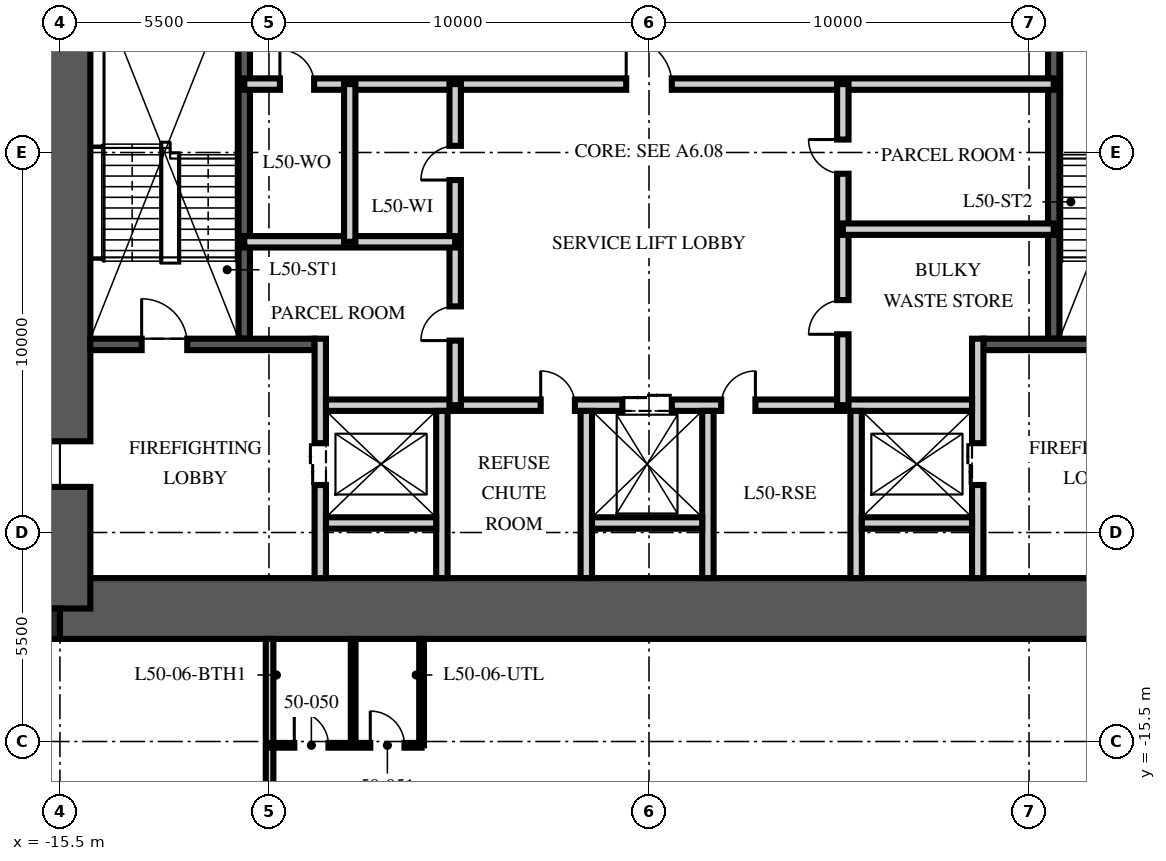
"""IFC4 building model, lengths in metres.
Left out: names, types, materials, properties, quantities, classifications, styles, units other than length and angle.
Written with IfcOpenShell. Run it as: python <this file> out.ifc"""

import sys

from ifc_helpers import new_model, si_unit, direction, frame, frame_2d, origin, origin_2d, place, context, subcontext, project, spatial, rectangle, extrude, element, fill, save


model = new_model("IFC4")
c1 = context("Model", 3, precision=1e-05, world=origin(), true_north=direction((0.0, 1.0)))
c2 = subcontext(c1, "Body", "Model", "MODEL_VIEW")
j1 = project(units=[si_unit("LENGTHUNIT", "METRE"), si_unit("PLANEANGLEUNIT", "RADIAN")], contexts=[c1])
p1 = place(None, origin())
s1 = spatial("IfcSite", under=j1, at=p1, CompositionType="ELEMENT")
p2 = place(p1, origin())
s2 = spatial("IfcBuilding", under=s1, at=p2, CompositionType="ELEMENT")
p3 = place(p2, frame((0.0, 0.0, 203.25)))
s3 = spatial("IfcBuildingStorey", under=s2, at=p3, CompositionType="ELEMENT", Elevation=203.25)
p4 = place(p3, frame((-15.5, -12.0, -0.25), z_axis=(0.0, 0.0, 1.0), x_axis=(1.0, 0.0, 0.0)))
e1 = element("IfcWall", 1, at=p4, inside=s3, PredefinedType="SHEAR", context=c2, shape_type="SweptSolid", body=[
    extrude(rectangle(XDim=31.0, YDim=1.6, at=frame_2d((15.5, 0.0))), origin(), (0.0, 0.0, 1.0), 3.75),
])
p5 = place(p3, frame((-15.5, -12.0, -0.25), z_axis=(0.0, 0.0, 1.0), x_axis=(0.0, 1.0, 0.0)))
e2 = element("IfcWall", 2, at=p5, inside=s3, PredefinedType="SHEAR", context=c2, shape_type="SweptSolid", body=[
    extrude(rectangle(XDim=24.0, YDim=1.6, at=frame_2d((12.0, 0.0))), origin(), (0.0, 0.0, 1.0), 3.75),
])
p6 = place(p5, frame((3.2, 0.0, 0.25)))
e3 = element("IfcOpeningElement", 3, at=p6, cuts=e2, PredefinedType="OPENING", context=c2, shape_type="SweptSolid", body=[
    extrude(rectangle(XDim=1.2, YDim=2.1, at=frame_2d((0.6, 1.05))), frame((0.0, 0.81, 0.0), z_axis=(0.0, -1.0, 0.0), x_axis=(1.0, 0.0, 0.0)), (0.0, 0.0, 1.0), 1.62),
])
p7 = place(p5, frame((19.3, 0.0, 0.25)))
e4 = element("IfcOpeningElement", 4, at=p7, cuts=e2, PredefinedType="OPENING", context=c2, shape_type="SweptSolid", body=[
    extrude(rectangle(XDim=1.8, YDim=2.1, at=frame_2d((0.9, 1.05))), frame((0.0, 0.81, 0.0), z_axis=(0.0, -1.0, 0.0), x_axis=(1.0, 0.0, 0.0)), (0.0, 0.0, 1.0), 1.62),
])
p8 = place(p3, frame((-15.9, -12.4, -0.25), z_axis=(0.0, 0.0, 1.0), x_axis=(1.0, 0.0, 0.0)))
e5 = element("IfcColumn", 5, at=p8, inside=s3, PredefinedType="COLUMN", context=c2, shape_type="SweptSolid", body=[
    extrude(rectangle(XDim=0.8, YDim=0.8, at=origin_2d()), origin(), (0.0, 0.0, 1.0), 3.75),
])
p9 = place(p3, frame((-10.65, -4.9, 0.0), z_axis=(0.0, 0.0, 1.0), x_axis=(0.0, 1.0, 0.0)))
e6 = element("IfcWall", 6, at=p9, inside=s3, PredefinedType="SOLIDWALL", context=c2, shape_type="SweptSolid", body=[
    extrude(rectangle(XDim=10.1, YDim=0.3, at=frame_2d((5.05, 0.0))), origin(), (0.0, 0.0, 1.0), 3.5),
])
p10 = place(p3, frame((-14.7, -5.05, 0.0), z_axis=(0.0, 0.0, 1.0), x_axis=(1.0, 0.0, 0.0)))
e7 = element("IfcWall", 7, at=p10, inside=s3, PredefinedType="SOLIDWALL", context=c2, shape_type="SweptSolid", body=[
    extrude(rectangle(XDim=5.9, YDim=0.3, at=frame_2d((2.95, 0.0))), origin(), (0.0, 0.0, 1.0), 3.5),
])
p11 = place(p10, frame((1.35, 0.0, 0.0)))
e8 = element("IfcOpeningElement", 8, at=p11, cuts=e7, PredefinedType="OPENING", context=c2, shape_type="SweptSolid", body=[
    extrude(rectangle(XDim=1.2, YDim=2.1, at=frame_2d((0.6, 1.05))), frame((0.0, 0.16, 0.0), z_axis=(0.0, -1.0, 0.0), x_axis=(1.0, 0.0, 0.0)), (0.0, 0.0, 1.0), 0.32),
])
p12 = place(p3, frame((-8.65, -11.2, 0.0), z_axis=(0.0, 0.0, 1.0), x_axis=(0.0, 1.0, 0.0)))
e9 = element("IfcWall", 9, at=p12, inside=s3, PredefinedType="PARTITIONING", context=c2, shape_type="SweptSolid", body=[
    extrude(rectangle(XDim=6.3, YDim=0.3, at=frame_2d((3.15, 0.0))), origin(), (0.0, 0.0, 1.0), 3.5),
])
p13 = place(p12, frame((2.45, 0.0, 0.0)))
e10 = element("IfcOpeningElement", 10, at=p13, cuts=e9, PredefinedType="OPENING", context=c2, shape_type="SweptSolid", body=[
    extrude(rectangle(XDim=1.1, YDim=2.1, at=frame_2d((0.55, 1.05))), frame((0.0, 0.16, 0.0), z_axis=(0.0, -1.0, 0.0), x_axis=(1.0, 0.0, 0.0)), (0.0, 0.0, 1.0), 0.32),
])
p14 = place(p3, frame((10.65, -4.9, 0.0), z_axis=(0.0, 0.0, 1.0), x_axis=(0.0, 1.0, 0.0)))
e11 = element("IfcWall", 11, at=p14, inside=s3, PredefinedType="SOLIDWALL", context=c2, shape_type="SweptSolid", body=[
    extrude(rectangle(XDim=10.1, YDim=0.3, at=frame_2d((5.05, 0.0))), origin(), (0.0, 0.0, 1.0), 3.5),
])
p15 = place(p3, frame((14.7, -5.05, 0.0), z_axis=(0.0, 0.0, 1.0), x_axis=(-1.0, 0.0, 0.0)))
e12 = element("IfcWall", 12, at=p15, inside=s3, PredefinedType="SOLIDWALL", context=c2, shape_type="SweptSolid", body=[
    extrude(rectangle(XDim=5.9, YDim=0.3, at=frame_2d((2.95, 0.0))), origin(), (0.0, 0.0, 1.0), 3.5),
])
p16 = place(p15, frame((1.35, 0.0, 0.0)))
e13 = element("IfcOpeningElement", 13, at=p16, cuts=e12, PredefinedType="OPENING", context=c2, shape_type="SweptSolid", body=[
    extrude(rectangle(XDim=1.2, YDim=2.1, at=frame_2d((0.6, 1.05))), frame((0.0, 0.16, 0.0), z_axis=(0.0, -1.0, 0.0), x_axis=(1.0, 0.0, 0.0)), (0.0, 0.0, 1.0), 0.32),
])
p17 = place(p3, frame((8.65, -11.2, 0.0), z_axis=(0.0, 0.0, 1.0), x_axis=(0.0, 1.0, 0.0)))
e14 = element("IfcWall", 14, at=p17, inside=s3, PredefinedType="PARTITIONING", context=c2, shape_type="SweptSolid", body=[
    extrude(rectangle(XDim=6.3, YDim=0.3, at=frame_2d((3.15, 0.0))), origin(), (0.0, 0.0, 1.0), 3.5),
])
p18 = place(p17, frame((2.45, 0.0, 0.0)))
e15 = element("IfcOpeningElement", 15, at=p18, cuts=e14, PredefinedType="OPENING", context=c2, shape_type="SweptSolid", body=[
    extrude(rectangle(XDim=1.1, YDim=2.1, at=frame_2d((0.55, 1.05))), frame((0.0, 0.16, 0.0), z_axis=(0.0, -1.0, 0.0), x_axis=(1.0, 0.0, 0.0)), (0.0, 0.0, 1.0), 0.32),
])
p19 = place(p3, frame((-8.5, -6.65, 0.0), z_axis=(0.0, 0.0, 1.0), x_axis=(1.0, 0.0, 0.0)))
e16 = element("IfcWall", 16, at=p19, inside=s3, PredefinedType="PARTITIONING", context=c2, shape_type="SweptSolid", body=[
    extrude(rectangle(XDim=17.0, YDim=0.3, at=frame_2d((8.5, 0.0))), origin(), (0.0, 0.0, 1.0), 3.5),
])
p20 = place(p19, frame((7.8, 0.0, 0.0)))
e17 = element("IfcOpeningElement", 17, at=p20, cuts=e16, PredefinedType="OPENING", context=c2, shape_type="SweptSolid", body=[
    extrude(rectangle(XDim=1.3, YDim=2.4, at=frame_2d((0.65, 1.2))), frame((0.0, 0.16, 0.0), z_axis=(0.0, -1.0, 0.0), x_axis=(1.0, 0.0, 0.0)), (0.0, 0.0, 1.0), 0.32),
])
p21 = place(p19, frame((5.65, 0.0, 0.0)))
e18 = element("IfcOpeningElement", 18, at=p21, cuts=e16, PredefinedType="OPENING", context=c2, shape_type="SweptSolid", body=[
    extrude(rectangle(XDim=0.9, YDim=2.1, at=frame_2d((0.45, 1.05))), frame((0.0, 0.16, 0.0), z_axis=(0.0, -1.0, 0.0), x_axis=(1.0, 0.0, 0.0)), (0.0, 0.0, 1.0), 0.32),
])
p22 = place(p19, frame((10.4, 0.0, 0.0)))
e19 = element("IfcOpeningElement", 19, at=p22, cuts=e16, PredefinedType="OPENING", context=c2, shape_type="SweptSolid", body=[
    extrude(rectangle(XDim=0.9, YDim=2.1, at=frame_2d((0.45, 1.05))), frame((0.0, 0.16, 0.0), z_axis=(0.0, -1.0, 0.0), x_axis=(1.0, 0.0, 0.0)), (0.0, 0.0, 1.0), 0.32),
])
for number, where, z_axis, x_axis in (
    (20, (-5.45, -11.2, 0.0), (0.0, 0.0, 1.0), (0.0, 1.0, 0.0)),
    (21, (-1.65, -11.2, 0.0), (0.0, 0.0, 1.0), (0.0, 1.0, 0.0)),
    (22, (1.55, -11.2, 0.0), (0.0, 0.0, 1.0), (0.0, 1.0, 0.0)),
    (23, (5.45, -11.2, 0.0), (0.0, 0.0, 1.0), (0.0, 1.0, 0.0)),
):
    element("IfcWall", number, at=place(p3, frame(where, z_axis=z_axis, x_axis=x_axis)), inside=s3, PredefinedType="PARTITIONING", context=c2, shape_type="SweptSolid", body=[
        extrude(rectangle(XDim=4.4, YDim=0.3, at=frame_2d((2.2, 0.0))), origin(), (0.0, 0.0, 1.0), 3.5),
    ])
for number, where, z_axis, x_axis in (
    (24, (-8.5, -9.75, 0.0), (0.0, 0.0, 1.0), (1.0, 0.0, 0.0)),
    (25, (-1.5, -9.75, 0.0), (0.0, 0.0, 1.0), (1.0, 0.0, 0.0)),
    (26, (5.6, -9.75, 0.0), (0.0, 0.0, 1.0), (1.0, 0.0, 0.0)),
):
    element("IfcWall", number, at=place(p3, frame(where, z_axis=z_axis, x_axis=x_axis)), inside=s3, PredefinedType="PARTITIONING", context=c2, shape_type="SweptSolid", body=[
        extrude(rectangle(XDim=2.9, YDim=0.3, at=frame_2d((1.45, 0.0))), origin(), (0.0, 0.0, 1.0), 3.5),
    ])
p23 = place(p3, frame((-10.65, 1.8, 0.0), z_axis=(0.0, 0.0, 1.0), x_axis=(1.0, 0.0, 0.0)))
e27 = element("IfcWall", 27, at=p23, inside=s3, PredefinedType="PARTITIONING", context=c2, shape_type="SweptSolid", body=[
    extrude(rectangle(XDim=21.3, YDim=0.3, at=frame_2d((10.65, 0.0))), origin(), (0.0, 0.0, 1.0), 3.5),
])
p24 = place(p23, frame((10.05, 0.0, 0.0)))
e28 = element("IfcOpeningElement", 28, at=p24, cuts=e27, PredefinedType="OPENING", context=c2, shape_type="SweptSolid", body=[
    extrude(rectangle(XDim=1.2, YDim=2.1, at=frame_2d((0.6, 1.05))), frame((0.0, 0.16, 0.0), z_axis=(0.0, -1.0, 0.0), x_axis=(1.0, 0.0, 0.0)), (0.0, 0.0, 1.0), 0.32),
])
p25 = place(p23, frame((0.938, 0.0, 0.0)))
e29 = element("IfcOpeningElement", 29, at=p25, cuts=e27, PredefinedType="OPENING", context=c2, shape_type="SweptSolid", body=[
    extrude(rectangle(XDim=0.9, YDim=2.1, at=frame_2d((0.45, 1.05))), frame((0.0, 0.16, 0.0), z_axis=(0.0, -1.0, 0.0), x_axis=(1.0, 0.0, 0.0)), (0.0, 0.0, 1.0), 0.32),
])
p26 = place(p3, frame((-5.1, -6.65, 0.0), z_axis=(0.0, 0.0, 1.0), x_axis=(0.0, 1.0, 0.0)))
e30 = element("IfcWall", 30, at=p26, inside=s3, PredefinedType="PARTITIONING", context=c2, shape_type="SweptSolid", body=[
    extrude(rectangle(XDim=8.45, YDim=0.3, at=frame_2d((4.225, 0.0))), origin(), (0.0, 0.0, 1.0), 3.5),
])
p27 = place(p26, frame((1.7, 0.0, 0.0)))
e31 = element("IfcOpeningElement", 31, at=p27, cuts=e30, PredefinedType="OPENING", context=c2, shape_type="SweptSolid", body=[
    extrude(rectangle(XDim=0.9, YDim=2.1, at=frame_2d((0.45, 1.05))), frame((0.0, 0.16, 0.0), z_axis=(0.0, -1.0, 0.0), x_axis=(1.0, 0.0, 0.0)), (0.0, 0.0, 1.0), 0.32),
])
p28 = place(p26, frame((5.925, 0.0, 0.0)))
e32 = element("IfcOpeningElement", 32, at=p28, cuts=e30, PredefinedType="OPENING", context=c2, shape_type="SweptSolid", body=[
    extrude(rectangle(XDim=0.9, YDim=2.1, at=frame_2d((0.45, 1.05))), frame((0.0, 0.16, 0.0), z_axis=(0.0, -1.0, 0.0), x_axis=(1.0, 0.0, 0.0)), (0.0, 0.0, 1.0), 0.32),
])
p29 = place(p3, frame((5.1, -6.65, 0.0), z_axis=(0.0, 0.0, 1.0), x_axis=(0.0, 1.0, 0.0)))
e33 = element("IfcWall", 33, at=p29, inside=s3, PredefinedType="PARTITIONING", context=c2, shape_type="SweptSolid", body=[
    extrude(rectangle(XDim=8.45, YDim=0.3, at=frame_2d((4.225, 0.0))), origin(), (0.0, 0.0, 1.0), 3.5),
])
p30 = place(p29, frame((1.866, 0.0, 0.0)))
e34 = element("IfcOpeningElement", 34, at=p30, cuts=e33, PredefinedType="OPENING", context=c2, shape_type="SweptSolid", body=[
    extrude(rectangle(XDim=0.9, YDim=2.1, at=frame_2d((0.45, 1.05))), frame((0.0, 0.16, 0.0), z_axis=(0.0, -1.0, 0.0), x_axis=(1.0, 0.0, 0.0)), (0.0, 0.0, 1.0), 0.32),
])
p31 = place(p29, frame((6.091, 0.0, 0.0)))
e35 = element("IfcOpeningElement", 35, at=p31, cuts=e33, PredefinedType="OPENING", context=c2, shape_type="SweptSolid", body=[
    extrude(rectangle(XDim=0.9, YDim=2.1, at=frame_2d((0.45, 1.05))), frame((0.0, 0.16, 0.0), z_axis=(0.0, -1.0, 0.0), x_axis=(1.0, 0.0, 0.0)), (0.0, 0.0, 1.0), 0.32),
])
p32 = place(p3, frame((-10.65, -2.35, 0.0), z_axis=(0.0, 0.0, 1.0), x_axis=(1.0, 0.0, 0.0)))
e36 = element("IfcWall", 36, at=p32, inside=s3, PredefinedType="PARTITIONING", context=c2, shape_type="SweptSolid", body=[
    extrude(rectangle(XDim=5.55, YDim=0.3, at=frame_2d((2.775, 0.0))), origin(), (0.0, 0.0, 1.0), 3.5),
])
p33 = place(p3, frame((-7.875, -2.35, 0.0), z_axis=(0.0, 0.0, 1.0), x_axis=(0.0, 1.0, 0.0)))
e37 = element("IfcWall", 37, at=p33, inside=s3, PredefinedType="PARTITIONING", context=c2, shape_type="SweptSolid", body=[
    extrude(rectangle(XDim=4.15, YDim=0.3, at=frame_2d((2.075, 0.0))), origin(), (0.0, 0.0, 1.0), 3.5),
])
p34 = place(p3, frame((10.65, -2.018, 0.0), z_axis=(0.0, 0.0, 1.0), x_axis=(-1.0, 0.0, 0.0)))
e38 = element("IfcWall", 38, at=p34, inside=s3, PredefinedType="PARTITIONING", context=c2, shape_type="SweptSolid", body=[
    extrude(rectangle(XDim=5.55, YDim=0.3, at=frame_2d((2.775, 0.0))), origin(), (0.0, 0.0, 1.0), 3.5),
])
p35 = place(p3, frame((-9.984, -12.8, 0.0), z_axis=(0.0, 0.0, 1.0), x_axis=(0.0, -1.0, 0.0)))
e39 = element("IfcWall", 39, at=p35, inside=s3, PredefinedType="PARTITIONING", context=c2, shape_type="SweptSolid", body=[
    extrude(rectangle(XDim=13.65, YDim=0.2, at=frame_2d((6.825, 0.0))), origin(), (0.0, 0.0, 1.0), 2.91),
])
p36 = place(p3, frame((-9.984, -15.6, 0.0), z_axis=(0.0, 0.0, 1.0), x_axis=(1.0, 0.0, 0.0)))
e40 = element("IfcWall", 40, at=p36, inside=s3, PredefinedType="PARTITIONING", context=c2, shape_type="SweptSolid", body=[
    extrude(rectangle(XDim=4.0, YDim=0.125, at=frame_2d((2.0, 0.0))), origin(), (0.0, 0.0, 1.0), 2.6),
])
p37 = place(p36, frame((0.65, 0.0, 0.0)))
e41 = element("IfcOpeningElement", 41, at=p37, cuts=e40, PredefinedType="OPENING", context=c2, shape_type="SweptSolid", body=[
    extrude(rectangle(XDim=0.9, YDim=2.1, at=frame_2d((0.45, 1.05))), frame((0.0, 0.073, 0.0), z_axis=(0.0, -1.0, 0.0), x_axis=(1.0, 0.0, 0.0)), (0.0, 0.0, 1.0), 0.145),
])
p38 = place(p36, frame((2.65, 0.0, 0.0)))
e42 = element("IfcOpeningElement", 42, at=p38, cuts=e40, PredefinedType="OPENING", context=c2, shape_type="SweptSolid", body=[
    extrude(rectangle(XDim=0.9, YDim=2.1, at=frame_2d((0.45, 1.05))), frame((0.0, 0.073, 0.0), z_axis=(0.0, -1.0, 0.0), x_axis=(1.0, 0.0, 0.0)), (0.0, 0.0, 1.0), 0.145),
])
for number, where, z_axis, x_axis in (
    (43, (-7.784, -12.8, 0.0), (0.0, 0.0, 1.0), (0.0, -1.0, 0.0)),
    (44, (-5.984, -12.8, 0.0), (0.0, 0.0, 1.0), (0.0, -1.0, 0.0)),
):
    element("IfcWall", number, at=place(p3, frame(where, z_axis=z_axis, x_axis=x_axis)), inside=s3, PredefinedType="PARTITIONING", context=c2, shape_type="SweptSolid", body=[
        extrude(rectangle(XDim=2.8, YDim=0.125, at=frame_2d((1.4, 0.0))), origin(), (0.0, 0.0, 1.0), 3.5),
    ])
p39 = place(p11, origin())
e45 = element("IfcDoor", 45, at=p39, inside=s3, OperationType="SINGLE_SWING_LEFT", PredefinedType="DOOR", context=c2, shape_type="SweptSolid", body=[
    extrude(rectangle(XDim=1.2, YDim=2.1, at=frame_2d((0.6, 1.05))), frame((0.0, 0.025, 0.0), z_axis=(0.0, -1.0, 0.0), x_axis=(1.0, 0.0, 0.0)), (0.0, 0.0, 1.0), 0.05),
])
fill(e8, e45)
p40 = place(p6, origin())
e46 = element("IfcDoor", 46, at=p40, inside=s3, OperationType="SINGLE_SWING_LEFT", PredefinedType="DOOR", context=c2, shape_type="SweptSolid", body=[
    extrude(rectangle(XDim=1.2, YDim=2.1, at=frame_2d((0.6, 1.05))), frame((0.0, 0.025, 0.0), z_axis=(0.0, -1.0, 0.0), x_axis=(1.0, 0.0, 0.0)), (0.0, 0.0, 1.0), 0.05),
])
fill(e3, e46)
p41 = place(p13, origin())
e47 = element("IfcDoor", 47, at=p41, inside=s3, OperationType="DOUBLE_DOOR_SLIDING", PredefinedType="DOOR", context=c2, shape_type="SweptSolid", body=[
    extrude(rectangle(XDim=1.1, YDim=2.1, at=frame_2d((0.55, 1.05))), frame((0.0, 0.025, 0.0), z_axis=(0.0, -1.0, 0.0), x_axis=(1.0, 0.0, 0.0)), (0.0, 0.0, 1.0), 0.05),
])
fill(e10, e47)
p42 = place(p18, origin())
e48 = element("IfcDoor", 48, at=p42, inside=s3, OperationType="DOUBLE_DOOR_SLIDING", PredefinedType="DOOR", context=c2, shape_type="SweptSolid", body=[
    extrude(rectangle(XDim=1.1, YDim=2.1, at=frame_2d((0.55, 1.05))), frame((0.0, 0.025, 0.0), z_axis=(0.0, -1.0, 0.0), x_axis=(1.0, 0.0, 0.0)), (0.0, 0.0, 1.0), 0.05),
])
fill(e15, e48)
p43 = place(p20, origin())
e49 = element("IfcDoor", 49, at=p43, inside=s3, OperationType="DOUBLE_DOOR_SLIDING", PredefinedType="DOOR", context=c2, shape_type="SweptSolid", body=[
    extrude(rectangle(XDim=1.3, YDim=2.4, at=frame_2d((0.65, 1.2))), frame((0.0, 0.025, 0.0), z_axis=(0.0, -1.0, 0.0), x_axis=(1.0, 0.0, 0.0)), (0.0, 0.0, 1.0), 0.05),
])
fill(e17, e49)
p44 = place(p24, origin())
e50 = element("IfcDoor", 50, at=p44, inside=s3, OperationType="SINGLE_SWING_LEFT", PredefinedType="DOOR", context=c2, shape_type="SweptSolid", body=[
    extrude(rectangle(XDim=1.2, YDim=2.1, at=frame_2d((0.6, 1.05))), frame((0.0, 0.025, 0.0), z_axis=(0.0, -1.0, 0.0), x_axis=(1.0, 0.0, 0.0)), (0.0, 0.0, 1.0), 0.05),
])
fill(e28, e50)
p45 = place(p21, origin())
e51 = element("IfcDoor", 51, at=p45, inside=s3, OperationType="SINGLE_SWING_LEFT", PredefinedType="DOOR", context=c2, shape_type="SweptSolid", body=[
    extrude(rectangle(XDim=0.9, YDim=2.1, at=frame_2d((0.45, 1.05))), frame((0.0, 0.025, 0.0), z_axis=(0.0, -1.0, 0.0), x_axis=(1.0, 0.0, 0.0)), (0.0, 0.0, 1.0), 0.05),
])
fill(e18, e51)
p46 = place(p22, origin())
e52 = element("IfcDoor", 52, at=p46, inside=s3, OperationType="SINGLE_SWING_RIGHT", PredefinedType="DOOR", context=c2, shape_type="SweptSolid", body=[
    extrude(rectangle(XDim=0.9, YDim=2.1, at=frame_2d((0.45, 1.05))), frame((0.0, 0.025, 0.0), z_axis=(0.0, -1.0, 0.0), x_axis=(1.0, 0.0, 0.0)), (0.0, 0.0, 1.0), 0.05),
])
fill(e19, e52)
p47 = place(p27, origin())
e53 = element("IfcDoor", 53, at=p47, inside=s3, OperationType="SINGLE_SWING_LEFT", PredefinedType="DOOR", context=c2, shape_type="SweptSolid", body=[
    extrude(rectangle(XDim=0.9, YDim=2.1, at=frame_2d((0.45, 1.05))), frame((0.0, 0.025, 0.0), z_axis=(0.0, -1.0, 0.0), x_axis=(1.0, 0.0, 0.0)), (0.0, 0.0, 1.0), 0.05),
])
fill(e31, e53)
p48 = place(p28, origin())
e54 = element("IfcDoor", 54, at=p48, inside=s3, OperationType="SINGLE_SWING_LEFT", PredefinedType="DOOR", context=c2, shape_type="SweptSolid", body=[
    extrude(rectangle(XDim=0.9, YDim=2.1, at=frame_2d((0.45, 1.05))), frame((0.0, 0.025, 0.0), z_axis=(0.0, -1.0, 0.0), x_axis=(1.0, 0.0, 0.0)), (0.0, 0.0, 1.0), 0.05),
])
fill(e32, e54)
p49 = place(p25, origin())
e55 = element("IfcDoor", 55, at=p49, inside=s3, OperationType="SINGLE_SWING_LEFT", PredefinedType="DOOR", context=c2, shape_type="SweptSolid", body=[
    extrude(rectangle(XDim=0.9, YDim=2.1, at=frame_2d((0.45, 1.05))), frame((0.0, 0.025, 0.0), z_axis=(0.0, -1.0, 0.0), x_axis=(1.0, 0.0, 0.0)), (0.0, 0.0, 1.0), 0.05),
])
fill(e29, e55)
p50 = place(p30, origin())
e56 = element("IfcDoor", 56, at=p50, inside=s3, OperationType="SINGLE_SWING_LEFT", PredefinedType="DOOR", context=c2, shape_type="SweptSolid", body=[
    extrude(rectangle(XDim=0.9, YDim=2.1, at=frame_2d((0.45, 1.05))), frame((0.0, 0.025, 0.0), z_axis=(0.0, -1.0, 0.0), x_axis=(1.0, 0.0, 0.0)), (0.0, 0.0, 1.0), 0.05),
])
fill(e34, e56)
p51 = place(p31, origin())
e57 = element("IfcDoor", 57, at=p51, inside=s3, OperationType="SINGLE_SWING_RIGHT", PredefinedType="DOOR", context=c2, shape_type="SweptSolid", body=[
    extrude(rectangle(XDim=0.9, YDim=2.1, at=frame_2d((0.45, 1.05))), frame((0.0, 0.025, 0.0), z_axis=(0.0, -1.0, 0.0), x_axis=(1.0, 0.0, 0.0)), (0.0, 0.0, 1.0), 0.05),
])
fill(e35, e57)
p52 = place(p37, origin())
e58 = element("IfcDoor", 58, at=p52, inside=s3, OperationType="SINGLE_SWING_LEFT", PredefinedType="DOOR", context=c2, shape_type="SweptSolid", body=[
    extrude(rectangle(XDim=0.9, YDim=2.1, at=frame_2d((0.45, 1.05))), frame((0.0, 0.025, 0.0), z_axis=(0.0, -1.0, 0.0), x_axis=(1.0, 0.0, 0.0)), (0.0, 0.0, 1.0), 0.05),
])
fill(e41, e58)
p53 = place(p38, origin())
e59 = element("IfcDoor", 59, at=p53, inside=s3, OperationType="SINGLE_SWING_LEFT", PredefinedType="DOOR", context=c2, shape_type="SweptSolid", body=[
    extrude(rectangle(XDim=0.9, YDim=2.1, at=frame_2d((0.45, 1.05))), frame((0.0, 0.025, 0.0), z_axis=(0.0, -1.0, 0.0), x_axis=(1.0, 0.0, 0.0)), (0.0, 0.0, 1.0), 0.05),
])
fill(e42, e59)
save(model, sys.argv[1])
